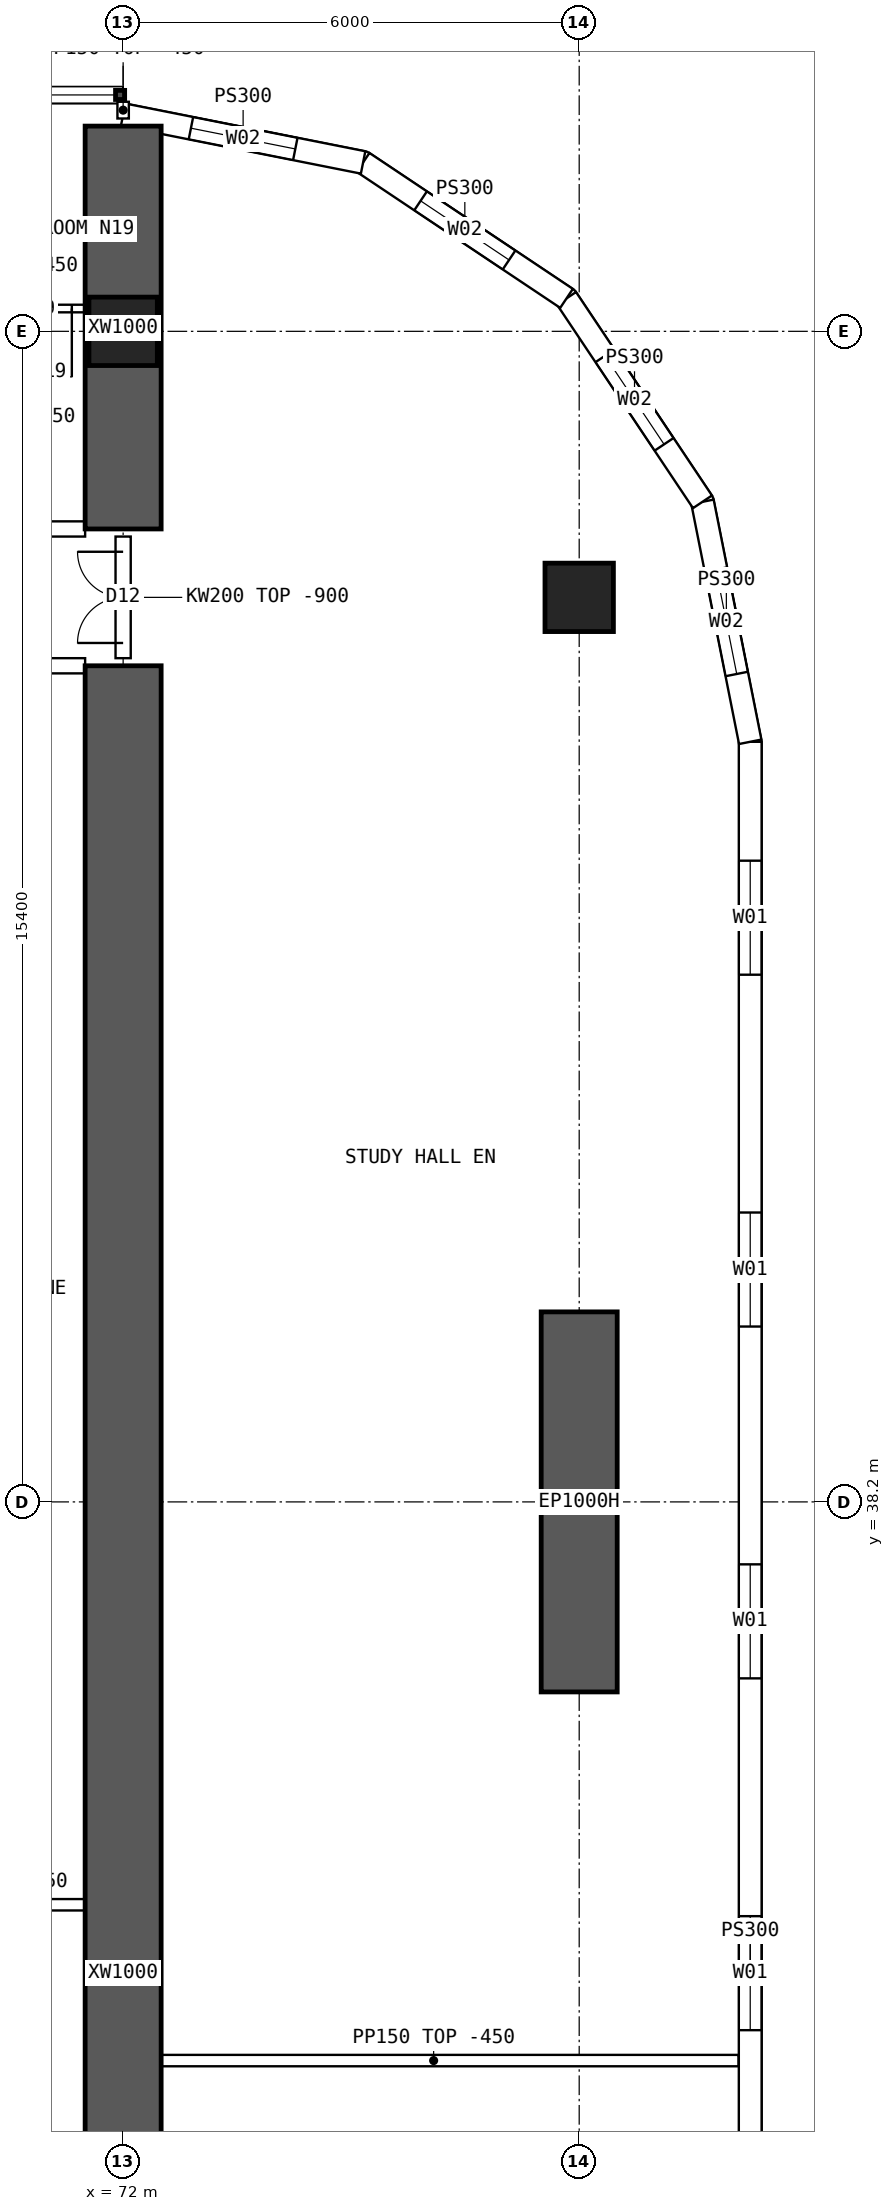
"""IFC4 building model, lengths in metres.
Left out: names, types, materials, properties, quantities, classifications, styles, units other than length and angle.
Written with IfcOpenShell. Run it as: python <this file> out.ifc"""

import sys

from ifc_helpers import new_model, si_unit, direction, frame, frame_2d, origin, origin_2d, place, context, subcontext, project, spatial, polyline, rectangle, hollow_rectangle, outline, extrude, element, fill, save


model = new_model("IFC4")
c1 = context("Model", 3, precision=1e-05, world=origin(), true_north=direction((0.0, 1.0)))
c2 = subcontext(c1, "Body", "Model", "MODEL_VIEW")
j1 = project(units=[si_unit("LENGTHUNIT", "METRE"), si_unit("PLANEANGLEUNIT", "RADIAN")], contexts=[c1])
p1 = place(None, origin())
s1 = spatial("IfcSite", under=j1, at=p1, CompositionType="ELEMENT")
p2 = place(p1, origin())
s2 = spatial("IfcBuilding", under=s1, at=p2, CompositionType="ELEMENT")
p3 = place(p2, frame((0.0, 0.0, 50.2)))
s3 = spatial("IfcBuildingStorey", under=s2, at=p3, CompositionType="ELEMENT", Elevation=50.2)
for number, where, z_axis, x_axis in (
    (1, (72.0, 53.6, 0.0), (0.0, 0.0, 1.0), (1.0, 0.0, 0.0)),
    (2, (78.0, 50.1, 0.0), (0.0, 0.0, 1.0), (1.0, 0.0, 0.0)),
):
    element("IfcColumn", number, at=place(p3, frame(where, z_axis=z_axis, x_axis=x_axis)), inside=s3, PredefinedType="COLUMN", context=c2, shape_type="SweptSolid", body=[
        extrude(hollow_rectangle(XDim=0.9, YDim=0.9, WallThickness=0.09, at=origin_2d()), origin(), (0.0, 0.0, 1.0), 3.75),
    ])
p4 = place(p3, frame((78.0, 35.7, 0.0), z_axis=(0.0, 0.0, 1.0), x_axis=(0.0, 1.0, 0.0)))
e3 = element("IfcWall", 3, at=p4, inside=s3, PredefinedType="SHEAR", context=c2, shape_type="SweptSolid", body=[
    extrude(rectangle(XDim=5.0, YDim=1.0, at=frame_2d((2.5, 0.0))), origin(), (0.0, 0.0, 1.0), 3.75),
])
p5 = place(p3, frame((72.0, 51.0, 0.0), z_axis=(0.0, 0.0, 1.0), x_axis=(0.0, 1.0, 0.0)))
e4 = element("IfcWall", 4, at=p5, inside=s3, PredefinedType="SHEAR", context=c2, shape_type="SweptSolid", body=[
    extrude(rectangle(XDim=5.3, YDim=1.0, at=frame_2d((2.65, 0.0))), origin(), (0.0, 0.0, 1.0), 3.75),
])
p6 = place(p3, frame((72.0, 14.8, 0.0), z_axis=(0.0, 0.0, 1.0), x_axis=(0.0, 1.0, 0.0)))
e5 = element("IfcWall", 5, at=p6, inside=s3, PredefinedType="SHEAR", context=c2, shape_type="SweptSolid", body=[
    extrude(rectangle(XDim=34.4, YDim=1.0, at=frame_2d((17.2, 0.0))), origin(), (0.0, 0.0, 1.0), 3.75),
])
p7 = place(p3, frame((80.25, 15.8, 0.0), z_axis=(0.0, 0.0, 1.0), x_axis=(0.0, 1.0, 0.0)))
e6 = element("IfcWall", 6, at=p7, inside=s3, PredefinedType="SOLIDWALL", context=c2, shape_type="SweptSolid", body=[
    extrude(outline(polyline([(-0.015, -0.15), (32.415, -0.15), (32.385, 0.15), (0.015, 0.15), (-0.015, -0.15)])), origin(), (0.0, 0.0, 1.0), 3.3),
])
p8 = place(p7, frame((1.564, 0.0, 0.9)))
e7 = element("IfcOpeningElement", 7, at=p8, cuts=e6, PredefinedType="OPENING", context=c2, shape_type="SweptSolid", body=[
    extrude(rectangle(XDim=1.5, YDim=2.0, at=frame_2d((0.75, 1.0))), frame((0.0, 0.16, 0.0), z_axis=(0.0, -1.0, 0.0), x_axis=(1.0, 0.0, 0.0)), (0.0, 0.0, 1.0), 0.32),
])
p9 = place(p7, frame((6.193, 0.0, 0.9)))
e8 = element("IfcOpeningElement", 8, at=p9, cuts=e6, PredefinedType="OPENING", context=c2, shape_type="SweptSolid", body=[
    extrude(rectangle(XDim=1.5, YDim=2.0, at=frame_2d((0.75, 1.0))), frame((0.0, 0.16, 0.0), z_axis=(0.0, -1.0, 0.0), x_axis=(1.0, 0.0, 0.0)), (0.0, 0.0, 1.0), 0.32),
])
p10 = place(p7, frame((10.822, 0.0, 0.9)))
e9 = element("IfcOpeningElement", 9, at=p10, cuts=e6, PredefinedType="OPENING", context=c2, shape_type="SweptSolid", body=[
    extrude(rectangle(XDim=1.5, YDim=2.0, at=frame_2d((0.75, 1.0))), frame((0.0, 0.16, 0.0), z_axis=(0.0, -1.0, 0.0), x_axis=(1.0, 0.0, 0.0)), (0.0, 0.0, 1.0), 0.32),
])
p11 = place(p7, frame((15.45, 0.0, 0.9)))
e10 = element("IfcOpeningElement", 10, at=p11, cuts=e6, PredefinedType="OPENING", context=c2, shape_type="SweptSolid", body=[
    extrude(rectangle(XDim=1.5, YDim=2.0, at=frame_2d((0.75, 1.0))), frame((0.0, 0.16, 0.0), z_axis=(0.0, -1.0, 0.0), x_axis=(1.0, 0.0, 0.0)), (0.0, 0.0, 1.0), 0.32),
])
p12 = place(p7, frame((20.079, 0.0, 0.9)))
e11 = element("IfcOpeningElement", 11, at=p12, cuts=e6, PredefinedType="OPENING", context=c2, shape_type="SweptSolid", body=[
    extrude(rectangle(XDim=1.5, YDim=2.0, at=frame_2d((0.75, 1.0))), frame((0.0, 0.16, 0.0), z_axis=(0.0, -1.0, 0.0), x_axis=(1.0, 0.0, 0.0)), (0.0, 0.0, 1.0), 0.32),
])
p13 = place(p7, frame((24.707, 0.0, 0.9)))
e12 = element("IfcOpeningElement", 12, at=p13, cuts=e6, PredefinedType="OPENING", context=c2, shape_type="SweptSolid", body=[
    extrude(rectangle(XDim=1.5, YDim=2.0, at=frame_2d((0.75, 1.0))), frame((0.0, 0.16, 0.0), z_axis=(0.0, -1.0, 0.0), x_axis=(1.0, 0.0, 0.0)), (0.0, 0.0, 1.0), 0.32),
])
p14 = place(p7, frame((29.336, 0.0, 0.9)))
e13 = element("IfcOpeningElement", 13, at=p14, cuts=e6, PredefinedType="OPENING", context=c2, shape_type="SweptSolid", body=[
    extrude(rectangle(XDim=1.5, YDim=2.0, at=frame_2d((0.75, 1.0))), frame((0.0, 0.16, 0.0), z_axis=(0.0, -1.0, 0.0), x_axis=(1.0, 0.0, 0.0)), (0.0, 0.0, 1.0), 0.32),
])
p15 = place(p3, frame((80.25, 48.2, 0.0), z_axis=(0.0, 0.0, 1.0), x_axis=(-0.195065901187, 0.980790137692, 0.0)))
e14 = element("IfcWall", 14, at=p15, inside=s3, PredefinedType="SOLIDWALL", context=c2, shape_type="SweptSolid", body=[
    extrude(outline(polyline([(-0.015, -0.15), (3.249, -0.15), (3.189, 0.15), (0.015, 0.15), (-0.015, -0.15)])), origin(), (0.0, 0.0, 1.0), 3.3),
])
p16 = place(p15, frame((0.909, 0.0, 0.9)))
e15 = element("IfcOpeningElement", 15, at=p16, cuts=e14, PredefinedType="OPENING", context=c2, shape_type="SweptSolid", body=[
    extrude(rectangle(XDim=1.4, YDim=1.8, at=frame_2d((0.7, 0.9))), frame((0.0, 0.16, 0.0), z_axis=(0.0, -1.0, 0.0), x_axis=(1.0, 0.0, 0.0)), (0.0, 0.0, 1.0), 0.32),
])
p17 = place(p3, frame((79.622, 51.357, 0.0), z_axis=(0.0, 0.0, 1.0), x_axis=(-0.555609954424, 0.831443069936, 0.0)))
e16 = element("IfcWall", 16, at=p17, inside=s3, PredefinedType="SOLIDWALL", context=c2, shape_type="SweptSolid", body=[
    extrude(outline(polyline([(-0.03, -0.15), (3.249, -0.15), (3.189, 0.15), (0.03, 0.15), (-0.03, -0.15)])), origin(), (0.0, 0.0, 1.0), 3.3),
])
p18 = place(p17, frame((0.909, 0.0, 0.9)))
e17 = element("IfcOpeningElement", 17, at=p18, cuts=e16, PredefinedType="OPENING", context=c2, shape_type="SweptSolid", body=[
    extrude(rectangle(XDim=1.4, YDim=1.8, at=frame_2d((0.7, 0.9))), frame((0.0, 0.16, 0.0), z_axis=(0.0, -1.0, 0.0), x_axis=(1.0, 0.0, 0.0)), (0.0, 0.0, 1.0), 0.32),
])
p19 = place(p3, frame((77.833, 54.034, 0.0), z_axis=(0.0, 0.0, 1.0), x_axis=(-0.831478105043, 0.555557522525, 0.0)))
e18 = element("IfcWall", 18, at=p19, inside=s3, PredefinedType="SOLIDWALL", context=c2, shape_type="SweptSolid", body=[
    extrude(outline(polyline([(-0.03, -0.15), (3.249, -0.15), (3.189, 0.15), (0.03, 0.15), (-0.03, -0.15)])), origin(), (0.0, 0.0, 1.0), 3.3),
])
p20 = place(p19, frame((0.909, 0.0, 0.9)))
e19 = element("IfcOpeningElement", 19, at=p20, cuts=e18, PredefinedType="OPENING", context=c2, shape_type="SweptSolid", body=[
    extrude(rectangle(XDim=1.4, YDim=1.8, at=frame_2d((0.7, 0.9))), frame((0.0, 0.16, 0.0), z_axis=(0.0, -1.0, 0.0), x_axis=(1.0, 0.0, 0.0)), (0.0, 0.0, 1.0), 0.32),
])
p21 = place(p3, frame((75.157, 55.822, 0.0), z_axis=(0.0, 0.0, 1.0), x_axis=(-0.980787251524, 0.195080412259, 0.0)))
e20 = element("IfcWall", 20, at=p21, inside=s3, PredefinedType="SOLIDWALL", context=c2, shape_type="SweptSolid", body=[
    extrude(outline(polyline([(-0.03, -0.15), (3.249, -0.15), (3.189, 0.15), (0.03, 0.15), (-0.03, -0.15)])), origin(), (0.0, 0.0, 1.0), 3.3),
])
p22 = place(p21, frame((0.909, 0.0, 0.9)))
e21 = element("IfcOpeningElement", 21, at=p22, cuts=e20, PredefinedType="OPENING", context=c2, shape_type="SweptSolid", body=[
    extrude(rectangle(XDim=1.4, YDim=1.8, at=frame_2d((0.7, 0.9))), frame((0.0, 0.16, 0.0), z_axis=(0.0, -1.0, 0.0), x_axis=(1.0, 0.0, 0.0)), (0.0, 0.0, 1.0), 0.32),
])
p23 = place(p3, frame((66.5, 51.0, 0.0), z_axis=(0.0, 0.0, 1.0), x_axis=(1.0, 0.0, 0.0)))
e22 = element("IfcWall", 22, at=p23, inside=s3, PredefinedType="SOLIDWALL", context=c2, shape_type="SweptSolid", body=[
    extrude(outline(polyline([(0.0, 0.0), (5.0, 0.0), (5.0, 2.9), (0.0, 2.9), (0.0, 0.0)])), frame((0.0, 0.1, 0.0), z_axis=(0.0, -1.0, 0.0), x_axis=(1.0, 0.0, 0.0)), (0.0, 0.0, 1.0), 0.2),
])
p24 = place(p23, frame((1.3, 0.0, 0.0)))
e23 = element("IfcOpeningElement", 23, at=p24, cuts=e22, PredefinedType="OPENING", context=c2, shape_type="SweptSolid", body=[
    extrude(rectangle(XDim=0.9, YDim=2.1, at=frame_2d((0.45, 1.05))), frame((0.0, 0.11, 0.0), z_axis=(0.0, -1.0, 0.0), x_axis=(1.0, 0.0, 0.0)), (0.0, 0.0, 1.0), 0.22),
])
p25 = place(p23, frame((2.675, 0.0, 0.0)))
e24 = element("IfcOpeningElement", 24, at=p25, cuts=e22, PredefinedType="OPENING", context=c2, shape_type="SweptSolid", body=[
    extrude(rectangle(XDim=0.9, YDim=2.1, at=frame_2d((0.45, 1.05))), frame((0.0, 0.11, 0.0), z_axis=(0.0, -1.0, 0.0), x_axis=(1.0, 0.0, 0.0)), (0.0, 0.0, 1.0), 0.22),
])
p26 = place(p3, frame((66.5, 49.2, 0.0), z_axis=(0.0, 0.0, 1.0), x_axis=(1.0, 0.0, 0.0)))
e25 = element("IfcWall", 25, at=p26, inside=s3, PredefinedType="SOLIDWALL", context=c2, shape_type="SweptSolid", body=[
    extrude(rectangle(XDim=5.0, YDim=0.2, at=frame_2d((2.5, 0.0))), origin(), (0.0, 0.0, 1.0), 3.3),
])
p27 = place(p26, frame((0.2, 0.0, 0.0)))
e26 = element("IfcOpeningElement", 26, at=p27, cuts=e25, PredefinedType="OPENING", context=c2, shape_type="SweptSolid", body=[
    extrude(rectangle(XDim=1.6, YDim=2.1, at=frame_2d((0.8, 1.05))), frame((0.0, 0.11, 0.0), z_axis=(0.0, -1.0, 0.0), x_axis=(1.0, 0.0, 0.0)), (0.0, 0.0, 1.0), 0.22),
])
p28 = place(p3, frame((70.25, 53.9, 0.0), z_axis=(0.0, 0.0, 1.0), x_axis=(1.0, 0.0, 0.0)))
e27 = element("IfcWall", 27, at=p28, inside=s3, PredefinedType="PARTITIONING", context=c2, shape_type="SweptSolid", body=[
    extrude(rectangle(XDim=1.3, YDim=0.1, at=frame_2d((0.65, 0.0))), origin(), (0.0, 0.0, 1.0), 3.3),
])
p29 = place(p28, frame((0.175, 0.0, 0.0)))
e28 = element("IfcOpeningElement", 28, at=p29, cuts=e27, PredefinedType="OPENING", context=c2, shape_type="SweptSolid", body=[
    extrude(rectangle(XDim=0.9, YDim=2.1, at=frame_2d((0.45, 1.05))), frame((0.0, 0.06, 0.0), z_axis=(0.0, -1.0, 0.0), x_axis=(1.0, 0.0, 0.0)), (0.0, 0.0, 1.0), 0.12),
])
p30 = place(p3, frame((68.4, 32.9, 0.0), z_axis=(0.0, 0.0, 1.0), x_axis=(1.0, 0.0, 0.0)))
e29 = element("IfcWall", 29, at=p30, inside=s3, PredefinedType="PARTITIONING", context=c2, shape_type="SweptSolid", body=[
    extrude(rectangle(XDim=3.6, YDim=0.15, at=frame_2d((1.8, 0.0))), origin(), (0.0, 0.0, 1.0), 3.3),
])
p31 = place(p3, frame((72.075, 30.85, 0.0), z_axis=(0.0, 0.0, 1.0), x_axis=(1.0, 0.0, 0.0)))
e30 = element("IfcWall", 30, at=p31, inside=s3, PredefinedType="PARTITIONING", context=c2, shape_type="SweptSolid", body=[
    extrude(outline(polyline([(0.0, 0.0), (8.02, 0.0), (8.02, 3.3), (6.227, 3.3), (6.225, 2.85), (5.627, 2.85), (5.625, 3.3), (0.0, 3.3), (0.0, 0.0)])), frame((0.0, 0.075, 0.0), z_axis=(0.0, -1.0, 0.0), x_axis=(1.0, 0.0, 0.0)), (0.0, 0.0, 1.0), 0.15),
])
p32 = place(p3, frame((72.0, 49.3, 0.0), z_axis=(0.0, 0.0, 1.0), x_axis=(0.0, 1.0, 0.0)))
e31 = element("IfcWall", 31, at=p32, inside=s3, PredefinedType="SOLIDWALL", context=c2, shape_type="SweptSolid", body=[
    extrude(outline(polyline([(0.0, 0.0), (1.6, 0.0), (1.6, 2.85), (0.0, 2.85), (0.0, 0.0)])), frame((0.0, 0.1, 0.0), z_axis=(0.0, -1.0, 0.0), x_axis=(1.0, 0.0, 0.0)), (0.0, 0.0, 1.0), 0.2),
])
p33 = place(p32, frame((0.2, 0.0, 0.0)))
e32 = element("IfcOpeningElement", 32, at=p33, cuts=e31, PredefinedType="OPENING", context=c2, shape_type="SweptSolid", body=[
    extrude(rectangle(XDim=1.2, YDim=2.1, at=frame_2d((0.6, 1.05))), frame((0.0, 0.11, 0.0), z_axis=(0.0, -1.0, 0.0), x_axis=(1.0, 0.0, 0.0)), (0.0, 0.0, 1.0), 0.22),
])
p34 = place(p3, frame((72.0, 56.4, 0.0), z_axis=(0.0, 0.0, 1.0), x_axis=(0.0, 1.0, 0.0)))
e33 = element("IfcWall", 33, at=p34, inside=s3, PredefinedType="PARTITIONING", context=c2, shape_type="SweptSolid", body=[
    extrude(rectangle(XDim=0.22, YDim=0.15, at=frame_2d((0.11, 0.0))), origin(), (0.0, 0.0, 1.0), 3.3),
])
p35 = place(p11, origin())
e34 = element("IfcWindow", 34, at=p35, inside=s3, PartitioningType="SINGLE_PANEL", PredefinedType="WINDOW", context=c2, shape_type="SweptSolid", body=[
    extrude(rectangle(XDim=1.5, YDim=2.0, at=frame_2d((0.75, 1.0))), frame((0.0, 0.03, 0.0), z_axis=(0.0, -1.0, 0.0), x_axis=(1.0, 0.0, 0.0)), (0.0, 0.0, 1.0), 0.06),
])
fill(e10, e34)
p36 = place(p12, origin())
e35 = element("IfcWindow", 35, at=p36, inside=s3, PartitioningType="SINGLE_PANEL", PredefinedType="WINDOW", context=c2, shape_type="SweptSolid", body=[
    extrude(rectangle(XDim=1.5, YDim=2.0, at=frame_2d((0.75, 1.0))), frame((0.0, 0.03, 0.0), z_axis=(0.0, -1.0, 0.0), x_axis=(1.0, 0.0, 0.0)), (0.0, 0.0, 1.0), 0.06),
])
fill(e11, e35)
p37 = place(p13, origin())
e36 = element("IfcWindow", 36, at=p37, inside=s3, PartitioningType="SINGLE_PANEL", PredefinedType="WINDOW", context=c2, shape_type="SweptSolid", body=[
    extrude(rectangle(XDim=1.5, YDim=2.0, at=frame_2d((0.75, 1.0))), frame((0.0, 0.03, 0.0), z_axis=(0.0, -1.0, 0.0), x_axis=(1.0, 0.0, 0.0)), (0.0, 0.0, 1.0), 0.06),
])
fill(e12, e36)
p38 = place(p14, origin())
e37 = element("IfcWindow", 37, at=p38, inside=s3, PartitioningType="SINGLE_PANEL", PredefinedType="WINDOW", context=c2, shape_type="SweptSolid", body=[
    extrude(rectangle(XDim=1.5, YDim=2.0, at=frame_2d((0.75, 1.0))), frame((0.0, 0.03, 0.0), z_axis=(0.0, -1.0, 0.0), x_axis=(1.0, 0.0, 0.0)), (0.0, 0.0, 1.0), 0.06),
])
fill(e13, e37)
p39 = place(p16, origin())
e38 = element("IfcWindow", 38, at=p39, inside=s3, PartitioningType="SINGLE_PANEL", PredefinedType="WINDOW", context=c2, shape_type="SweptSolid", body=[
    extrude(rectangle(XDim=1.4, YDim=1.8, at=frame_2d((0.7, 0.9))), frame((0.0, 0.03, 0.0), z_axis=(0.0, -1.0, 0.0), x_axis=(1.0, 0.0, 0.0)), (0.0, 0.0, 1.0), 0.06),
])
fill(e15, e38)
p40 = place(p18, origin())
e39 = element("IfcWindow", 39, at=p40, inside=s3, PartitioningType="SINGLE_PANEL", PredefinedType="WINDOW", context=c2, shape_type="SweptSolid", body=[
    extrude(rectangle(XDim=1.4, YDim=1.8, at=frame_2d((0.7, 0.9))), frame((0.0, 0.03, 0.0), z_axis=(0.0, -1.0, 0.0), x_axis=(1.0, 0.0, 0.0)), (0.0, 0.0, 1.0), 0.06),
])
fill(e17, e39)
p41 = place(p20, origin())
e40 = element("IfcWindow", 40, at=p41, inside=s3, PartitioningType="SINGLE_PANEL", PredefinedType="WINDOW", context=c2, shape_type="SweptSolid", body=[
    extrude(rectangle(XDim=1.4, YDim=1.8, at=frame_2d((0.7, 0.9))), frame((0.0, 0.03, 0.0), z_axis=(0.0, -1.0, 0.0), x_axis=(1.0, 0.0, 0.0)), (0.0, 0.0, 1.0), 0.06),
])
fill(e19, e40)
p42 = place(p22, origin())
e41 = element("IfcWindow", 41, at=p42, inside=s3, PartitioningType="SINGLE_PANEL", PredefinedType="WINDOW", context=c2, shape_type="SweptSolid", body=[
    extrude(rectangle(XDim=1.4, YDim=1.8, at=frame_2d((0.7, 0.9))), frame((0.0, 0.03, 0.0), z_axis=(0.0, -1.0, 0.0), x_axis=(1.0, 0.0, 0.0)), (0.0, 0.0, 1.0), 0.06),
])
fill(e21, e41)
p43 = place(p29, origin())
e42 = element("IfcDoor", 42, at=p43, inside=s3, OperationType="SINGLE_SWING_RIGHT", PredefinedType="DOOR", context=c2, shape_type="SweptSolid", body=[
    extrude(rectangle(XDim=0.9, YDim=2.1, at=frame_2d((0.45, 1.05))), frame((0.0, 0.025, 0.0), z_axis=(0.0, -1.0, 0.0), x_axis=(1.0, 0.0, 0.0)), (0.0, 0.0, 1.0), 0.05),
])
fill(e28, e42)
p44 = place(p33, origin())
e43 = element("IfcDoor", 43, at=p44, inside=s3, OperationType="DOUBLE_DOOR_SINGLE_SWING", PredefinedType="DOOR", context=c2, shape_type="SweptSolid", body=[
    extrude(rectangle(XDim=1.2, YDim=2.1, at=frame_2d((0.6, 1.05))), frame((0.0, 0.025, 0.0), z_axis=(0.0, -1.0, 0.0), x_axis=(1.0, 0.0, 0.0)), (0.0, 0.0, 1.0), 0.05),
])
fill(e32, e43)
save(model, sys.argv[1])
